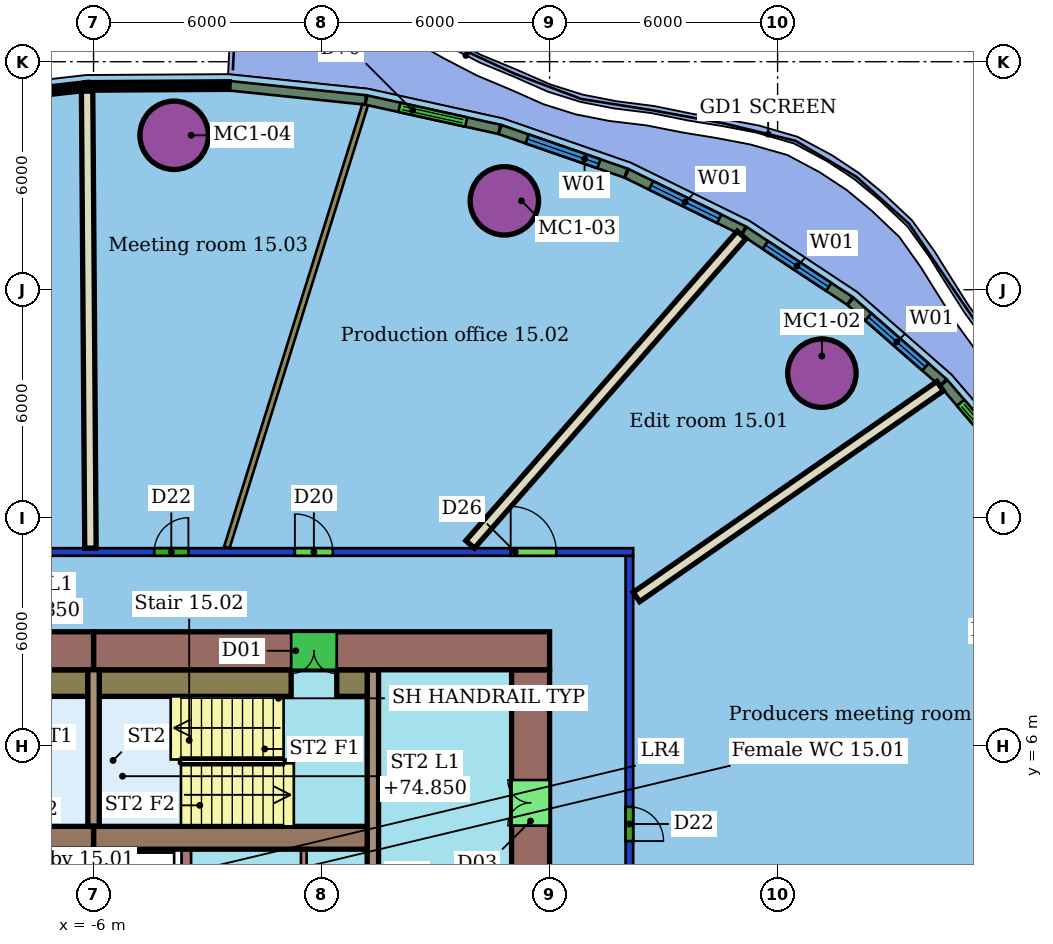
"""IFC4 building model, lengths in metres.
Left out: names, types, materials, properties, quantities, classifications, styles, units other than length and angle.
Written with IfcOpenShell. Run it as: python <this file> out.ifc"""

import sys

from ifc_helpers import new_model, si_unit, direction, frame, frame_2d, origin, origin_2d, place, context, subcontext, project, spatial, rectangle, hollow_circle, extrude, element, fill, save


model = new_model("IFC4")
c1 = context("Model", 3, precision=1e-05, world=origin(), true_north=direction((0.0, 1.0)))
c2 = subcontext(c1, "Body", "Model", "MODEL_VIEW")
j1 = project(units=[si_unit("LENGTHUNIT", "METRE"), si_unit("PLANEANGLEUNIT", "RADIAN")], contexts=[c1])
p1 = place(None, origin())
s1 = spatial("IfcSite", under=j1, at=p1, CompositionType="ELEMENT")
p2 = place(p1, origin())
s2 = spatial("IfcBuilding", under=s1, at=p2, CompositionType="ELEMENT")
p3 = place(p2, frame((0.0, 0.0, 73.0)))
s3 = spatial("IfcBuildingStorey", under=s2, at=p3, CompositionType="ELEMENT", Elevation=73.0)
for number, where, z_axis, x_axis in (
    (1, (13.166, 15.805, 0.0), (0.0, 0.0, 1.0), (1.0, 0.0, 0.0)),
    (2, (4.81, 20.339, 0.0), (0.0, 0.0, 1.0), (1.0, 0.0, 0.0)),
    (3, (-3.879, 22.064, 0.0), (0.0, 0.0, 1.0), (1.0, 0.0, 0.0)),
):
    element("IfcColumn", number, at=place(p3, frame(where, z_axis=z_axis, x_axis=x_axis)), inside=s3, PredefinedType="COLUMN", context=c2, shape_type="SweptSolid", body=[
        extrude(hollow_circle(Radius=0.9, WallThickness=0.06, at=origin_2d()), origin(), (0.0, 0.0, 1.0), 3.55),
    ])
p4 = place(p3, frame((-20.2, 11.1, 0.0), z_axis=(0.0, 0.0, 1.0), x_axis=(1.0, 0.0, 0.0)))
e4 = element("IfcWall", 4, at=p4, inside=s3, PredefinedType="PARTITIONING", context=c2, shape_type="SweptSolid", body=[
    extrude(rectangle(XDim=28.4, YDim=0.2, at=frame_2d((14.2, 0.0))), origin(), (0.0, 0.0, 1.0), 2.85),
])
p5 = place(p4, frame((25.176, 0.0, 0.0)))
e5 = element("IfcOpeningElement", 5, at=p5, cuts=e4, PredefinedType="OPENING", context=c2, shape_type="SweptSolid", body=[
    extrude(rectangle(XDim=1.2, YDim=2.1, at=frame_2d((0.6, 1.05))), frame((0.0, 0.11, 0.0), z_axis=(0.0, -1.0, 0.0), x_axis=(1.0, 0.0, 0.0)), (0.0, 0.0, 1.0), 0.22),
])
p6 = place(p4, frame((19.498, 0.0, 0.0)))
e6 = element("IfcOpeningElement", 6, at=p6, cuts=e4, PredefinedType="OPENING", context=c2, shape_type="SweptSolid", body=[
    extrude(rectangle(XDim=1.0, YDim=2.1, at=frame_2d((0.5, 1.05))), frame((0.0, 0.11, 0.0), z_axis=(0.0, -1.0, 0.0), x_axis=(1.0, 0.0, 0.0)), (0.0, 0.0, 1.0), 0.22),
])
p7 = place(p4, frame((15.796, 0.0, 0.0)))
e7 = element("IfcOpeningElement", 7, at=p7, cuts=e4, PredefinedType="OPENING", context=c2, shape_type="SweptSolid", body=[
    extrude(rectangle(XDim=0.9, YDim=2.1, at=frame_2d((0.45, 1.05))), frame((0.0, 0.11, 0.0), z_axis=(0.0, -1.0, 0.0), x_axis=(1.0, 0.0, 0.0)), (0.0, 0.0, 1.0), 0.22),
])
p8 = place(p4, frame((9.82, 0.0, 0.0)))
e8 = element("IfcOpeningElement", 8, at=p8, cuts=e4, PredefinedType="OPENING", context=c2, shape_type="SweptSolid", body=[
    extrude(rectangle(XDim=1.1, YDim=2.1, at=frame_2d((0.55, 1.05))), frame((0.0, 0.11, 0.0), z_axis=(0.0, -1.0, 0.0), x_axis=(1.0, 0.0, 0.0)), (0.0, 0.0, 1.0), 0.22),
])
p9 = place(p3, frame((8.1, 11.0, 0.0), z_axis=(0.0, 0.0, 1.0), x_axis=(0.0, -1.0, 0.0)))
e9 = element("IfcWall", 9, at=p9, inside=s3, PredefinedType="PARTITIONING", context=c2, shape_type="SweptSolid", body=[
    extrude(rectangle(XDim=22.0, YDim=0.2, at=frame_2d((11.0, 0.0))), origin(), (0.0, 0.0, 1.0), 2.85),
])
p10 = place(p9, frame((13.246, 0.0, 0.0)))
e10 = element("IfcOpeningElement", 10, at=p10, cuts=e9, PredefinedType="OPENING", context=c2, shape_type="SweptSolid", body=[
    extrude(rectangle(XDim=1.8, YDim=2.1, at=frame_2d((0.9, 1.05))), frame((0.0, 0.11, 0.0), z_axis=(0.0, -1.0, 0.0), x_axis=(1.0, 0.0, 0.0)), (0.0, 0.0, 1.0), 0.22),
])
p11 = place(p9, frame((6.607, 0.0, 0.0)))
e11 = element("IfcOpeningElement", 11, at=p11, cuts=e9, PredefinedType="OPENING", context=c2, shape_type="SweptSolid", body=[
    extrude(rectangle(XDim=0.9, YDim=2.1, at=frame_2d((0.45, 1.05))), frame((0.0, 0.11, 0.0), z_axis=(0.0, -1.0, 0.0), x_axis=(1.0, 0.0, 0.0)), (0.0, 0.0, 1.0), 0.22),
])
p12 = place(p3, frame((16.277, 15.463, 0.0), z_axis=(0.0, 0.0, 1.0), x_axis=(-0.821490466396, -0.57022224932, 0.0)))
e12 = element("IfcWall", 12, at=p12, inside=s3, PredefinedType="PARTITIONING", context=c2, shape_type="SweptSolid", body=[
    extrude(rectangle(XDim=9.728, YDim=0.3, at=frame_2d((4.864, 0.0))), origin(), (0.0, 0.0, 1.0), 3.55),
])
p13 = place(p3, frame((11.051, 19.441, 0.0), z_axis=(0.0, 0.0, 1.0), x_axis=(-0.659383505789, -0.75180675196, 0.0)))
e13 = element("IfcWall", 13, at=p13, inside=s3, PredefinedType="PARTITIONING", context=c2, shape_type="SweptSolid", body=[
    extrude(rectangle(XDim=10.83, YDim=0.3, at=frame_2d((5.415, 0.0))), origin(), (0.0, 0.0, 1.0), 3.55),
])
p14 = place(p3, frame((1.149, 22.87, 0.0), z_axis=(0.0, 0.0, 1.0), x_axis=(-0.298358151033, -0.954453987216, 0.0)))
e14 = element("IfcWall", 14, at=p14, inside=s3, PredefinedType="PARTITIONING", context=c2, shape_type="SweptSolid", body=[
    extrude(rectangle(XDim=12.203, YDim=0.15, at=frame_2d((6.102, 0.0))), origin(), (0.0, 0.0, 1.0), 3.55),
])
p15 = place(p3, frame((-6.17, 23.226, 0.0), z_axis=(0.0, 0.0, 1.0), x_axis=(0.007309152595, -0.999973287787, 0.0)))
e15 = element("IfcWall", 15, at=p15, inside=s3, PredefinedType="PARTITIONING", context=c2, shape_type="SweptSolid", body=[
    extrude(rectangle(XDim=12.025, YDim=0.3, at=frame_2d((6.012, 0.0))), origin(), (0.0, 0.0, 1.0), 3.55),
])
p16 = place(p3, frame((18.429, 13.147, 0.0), z_axis=(0.0, 0.0, 1.0), x_axis=(-0.651320140898, 0.75880305354, 0.0)))
e16 = element("IfcWall", 16, at=p16, inside=s3, PredefinedType="SOLIDWALL", context=c2, shape_type="SweptSolid", body=[
    extrude(rectangle(XDim=3.155, YDim=0.25, at=frame_2d((1.578, 0.0))), origin(), (0.0, 0.0, 1.0), 3.15),
])
p17 = place(p16, frame((0.677, 0.0, 0.0)))
e17 = element("IfcOpeningElement", 17, at=p17, cuts=e16, PredefinedType="OPENING", context=c2, shape_type="SweptSolid", body=[
    extrude(rectangle(XDim=1.8, YDim=2.4, at=frame_2d((0.9, 1.2))), frame((0.0, 0.135, 0.0), z_axis=(0.0, -1.0, 0.0), x_axis=(1.0, 0.0, 0.0)), (0.0, 0.0, 1.0), 0.27),
])
p18 = place(p3, frame((16.356, 15.56, 0.0), z_axis=(0.0, 0.0, 1.0), x_axis=(-0.752375826342, 0.658734101088, 0.0)))
e18 = element("IfcWall", 18, at=p18, inside=s3, PredefinedType="SOLIDWALL", context=c2, shape_type="SweptSolid", body=[
    extrude(rectangle(XDim=3.238, YDim=0.25, at=frame_2d((1.619, 0.0))), origin(), (0.0, 0.0, 1.0), 3.15),
])
p19 = place(p18, frame((0.619, 0.0, 0.8)))
e19 = element("IfcOpeningElement", 19, at=p19, cuts=e18, PredefinedType="OPENING", context=c2, shape_type="SweptSolid", body=[
    extrude(rectangle(XDim=2.0, YDim=2.2, at=frame_2d((1.0, 1.1))), frame((0.0, 0.135, 0.0), z_axis=(0.0, -1.0, 0.0), x_axis=(1.0, 0.0, 0.0)), (0.0, 0.0, 1.0), 0.27),
])
p20 = place(p3, frame((13.9, 17.708, 0.0), z_axis=(0.0, 0.0, 1.0), x_axis=(-0.834288934292, 0.551327465413, 0.0)))
e20 = element("IfcWall", 20, at=p20, inside=s3, PredefinedType="SOLIDWALL", context=c2, shape_type="SweptSolid", body=[
    extrude(rectangle(XDim=3.329, YDim=0.25, at=frame_2d((1.664, 0.0))), origin(), (0.0, 0.0, 1.0), 3.15),
])
p21 = place(p20, frame((0.664, 0.0, 0.8)))
e21 = element("IfcOpeningElement", 21, at=p21, cuts=e20, PredefinedType="OPENING", context=c2, shape_type="SweptSolid", body=[
    extrude(rectangle(XDim=2.0, YDim=2.2, at=frame_2d((1.0, 1.1))), frame((0.0, 0.135, 0.0), z_axis=(0.0, -1.0, 0.0), x_axis=(1.0, 0.0, 0.0)), (0.0, 0.0, 1.0), 0.27),
])
p22 = place(p3, frame((11.102, 19.555, 0.0), z_axis=(0.0, 0.0, 1.0), x_axis=(-0.89802471606, 0.439945007184, 0.0)))
e22 = element("IfcWall", 22, at=p22, inside=s3, PredefinedType="SOLIDWALL", context=c2, shape_type="SweptSolid", body=[
    extrude(rectangle(XDim=3.419, YDim=0.25, at=frame_2d((1.71, 0.0))), origin(), (0.0, 0.0, 1.0), 3.15),
])
p23 = place(p22, frame((0.71, 0.0, 0.8)))
e23 = element("IfcOpeningElement", 23, at=p23, cuts=e22, PredefinedType="OPENING", context=c2, shape_type="SweptSolid", body=[
    extrude(rectangle(XDim=2.0, YDim=2.2, at=frame_2d((1.0, 1.1))), frame((0.0, 0.135, 0.0), z_axis=(0.0, -1.0, 0.0), x_axis=(1.0, 0.0, 0.0)), (0.0, 0.0, 1.0), 0.27),
])
p24 = place(p3, frame((8.01, 21.069, 0.0), z_axis=(0.0, 0.0, 1.0), x_axis=(-0.944948803813, 0.327218211861, 0.0)))
e24 = element("IfcWall", 24, at=p24, inside=s3, PredefinedType="SOLIDWALL", context=c2, shape_type="SweptSolid", body=[
    extrude(rectangle(XDim=3.505, YDim=0.25, at=frame_2d((1.752, 0.0))), origin(), (0.0, 0.0, 1.0), 3.15),
])
p25 = place(p24, frame((0.753, 0.0, 0.8)))
e25 = element("IfcOpeningElement", 25, at=p25, cuts=e24, PredefinedType="OPENING", context=c2, shape_type="SweptSolid", body=[
    extrude(rectangle(XDim=2.0, YDim=2.2, at=frame_2d((1.0, 1.1))), frame((0.0, 0.135, 0.0), z_axis=(0.0, -1.0, 0.0), x_axis=(1.0, 0.0, 0.0)), (0.0, 0.0, 1.0), 0.27),
])
p26 = place(p3, frame((4.676, 22.222, 0.0), z_axis=(0.0, 0.0, 1.0), x_axis=(-0.976653338545, 0.214821452162, 0.0)))
e26 = element("IfcWall", 26, at=p26, inside=s3, PredefinedType="SOLIDWALL", context=c2, shape_type="SweptSolid", body=[
    extrude(rectangle(XDim=3.58, YDim=0.25, at=frame_2d((1.79, 0.0))), origin(), (0.0, 0.0, 1.0), 3.15),
])
p27 = place(p26, frame((0.89, 0.0, 0.0)))
e27 = element("IfcOpeningElement", 27, at=p27, cuts=e26, PredefinedType="OPENING", context=c2, shape_type="SweptSolid", body=[
    extrude(rectangle(XDim=1.8, YDim=2.4, at=frame_2d((0.9, 1.2))), frame((0.0, 0.135, 0.0), z_axis=(0.0, -1.0, 0.0), x_axis=(1.0, 0.0, 0.0)), (0.0, 0.0, 1.0), 0.27),
])
p28 = place(p3, frame((1.157, 22.994, 0.0), z_axis=(0.0, 0.0, 1.0), x_axis=(-0.994624966302, 0.10354311377, 0.0)))
e28 = element("IfcWall", 28, at=p28, inside=s3, PredefinedType="SOLIDWALL", context=c2, shape_type="SweptSolid", body=[
    extrude(rectangle(XDim=3.596, YDim=0.25, at=frame_2d((1.798, 0.0))), origin(), (0.0, 0.0, 1.0), 3.15),
])
p29 = place(p3, frame((6.0, 8.5, 0.0), z_axis=(0.0, 0.0, 1.0), x_axis=(-1.0, 0.0, 0.0)))
e29 = element("IfcWall", 29, at=p29, inside=s3, PredefinedType="SHEAR", context=c2, shape_type="SweptSolid", body=[
    extrude(rectangle(XDim=12.0, YDim=1.0, at=frame_2d((6.0, 0.0))), origin(), (0.0, 0.0, 1.0), 3.4),
])
p30 = place(p29, frame((5.6, 0.0, 0.0)))
e30 = element("IfcOpeningElement", 30, at=p30, cuts=e29, PredefinedType="OPENING", context=c2, shape_type="SweptSolid", body=[
    extrude(rectangle(XDim=1.2, YDim=2.1, at=frame_2d((0.6, 1.05))), frame((0.0, 0.51, 0.0), z_axis=(0.0, -1.0, 0.0), x_axis=(1.0, 0.0, 0.0)), (0.0, 0.0, 1.0), 1.02),
])
p31 = place(p3, frame((-6.0, 8.5, 0.0), z_axis=(0.0, 0.0, 1.0), x_axis=(-1.0, 0.0, 0.0)))
e31 = element("IfcWall", 31, at=p31, inside=s3, PredefinedType="SHEAR", context=c2, shape_type="SweptSolid", body=[
    extrude(rectangle(XDim=12.0, YDim=1.0, at=frame_2d((6.0, 0.0))), origin(), (0.0, 0.0, 1.0), 3.4),
])
p32 = place(p31, frame((5.2, 0.0, 0.0)))
e32 = element("IfcOpeningElement", 32, at=p32, cuts=e31, PredefinedType="OPENING", context=c2, shape_type="SweptSolid", body=[
    extrude(rectangle(XDim=1.2, YDim=2.1, at=frame_2d((0.6, 1.05))), frame((0.0, 0.51, 0.0), z_axis=(0.0, -1.0, 0.0), x_axis=(1.0, 0.0, 0.0)), (0.0, 0.0, 1.0), 1.02),
])
p33 = place(p3, frame((5.5, -8.0, 0.0), z_axis=(0.0, 0.0, 1.0), x_axis=(0.0, 1.0, 0.0)))
e33 = element("IfcWall", 33, at=p33, inside=s3, PredefinedType="SHEAR", context=c2, shape_type="SweptSolid", body=[
    extrude(rectangle(XDim=16.0, YDim=1.0, at=frame_2d((8.0, 0.0))), origin(), (0.0, 0.0, 1.0), 3.4),
])
p34 = place(p33, frame((2.9, 0.0, 0.0)))
e34 = element("IfcOpeningElement", 34, at=p34, cuts=e33, PredefinedType="OPENING", context=c2, shape_type="SweptSolid", body=[
    extrude(rectangle(XDim=1.2, YDim=2.1, at=frame_2d((0.6, 1.05))), frame((0.0, 0.51, 0.0), z_axis=(0.0, -1.0, 0.0), x_axis=(1.0, 0.0, 0.0)), (0.0, 0.0, 1.0), 1.02),
])
p35 = place(p33, frame((11.9, 0.0, 0.0)))
e35 = element("IfcOpeningElement", 35, at=p35, cuts=e33, PredefinedType="OPENING", context=c2, shape_type="SweptSolid", body=[
    extrude(rectangle(XDim=1.2, YDim=2.1, at=frame_2d((0.6, 1.05))), frame((0.0, 0.51, 0.0), z_axis=(0.0, -1.0, 0.0), x_axis=(1.0, 0.0, 0.0)), (0.0, 0.0, 1.0), 1.02),
])
for number, where, z_axis, x_axis in (
    (36, (-13.2, 3.58, 0.0), (0.0, 0.0, 1.0), (1.0, 0.0, 0.0)),
    (37, (-6.0, 3.58, 0.0), (0.0, 0.0, 1.0), (1.0, 0.0, 0.0)),
):
    element("IfcWall", number, at=place(p3, frame(where, z_axis=z_axis, x_axis=x_axis)), inside=s3, PredefinedType="SHEAR", context=c2, shape_type="SweptSolid", body=[
        extrude(rectangle(XDim=7.2, YDim=0.6, at=frame_2d((3.6, 0.0))), origin(), (0.0, 0.0, 1.0), 3.4),
    ])
p36 = place(p3, frame((1.35, -8.0, 0.0), z_axis=(0.0, 0.0, 1.0), x_axis=(0.0, 1.0, 0.0)))
e38 = element("IfcWall", 38, at=p36, inside=s3, PredefinedType="SHEAR", context=c2, shape_type="SweptSolid", body=[
    extrude(rectangle(XDim=16.0, YDim=0.3, at=frame_2d((8.0, 0.0))), origin(), (0.0, 0.0, 1.0), 3.4),
])
p37 = place(p36, frame((1.91, 0.0, 0.0)))
e39 = element("IfcOpeningElement", 39, at=p37, cuts=e38, PredefinedType="OPENING", context=c2, shape_type="SweptSolid", body=[
    extrude(rectangle(XDim=1.0, YDim=2.1, at=frame_2d((0.5, 1.05))), frame((0.0, 0.16, 0.0), z_axis=(0.0, -1.0, 0.0), x_axis=(1.0, 0.0, 0.0)), (0.0, 0.0, 1.0), 0.32),
])
p38 = place(p36, frame((7.25, 0.0, 0.0)))
e40 = element("IfcOpeningElement", 40, at=p38, cuts=e38, PredefinedType="OPENING", context=c2, shape_type="SweptSolid", body=[
    extrude(rectangle(XDim=1.5, YDim=2.1, at=frame_2d((0.75, 1.05))), frame((0.0, 0.16, 0.0), z_axis=(0.0, -1.0, 0.0), x_axis=(1.0, 0.0, 0.0)), (0.0, 0.0, 1.0), 0.32),
])
p39 = place(p3, frame((-6.0, 3.88, 0.0), z_axis=(0.0, 0.0, 1.0), x_axis=(0.0, 1.0, 0.0)))
e41 = element("IfcWall", 41, at=p39, inside=s3, PredefinedType="SHEAR", context=c2, shape_type="SweptSolid", body=[
    extrude(rectangle(XDim=4.12, YDim=0.3, at=frame_2d((2.06, 0.0))), origin(), (0.0, 0.0, 1.0), 3.4),
])
for number, where, z_axis, x_axis in (
    (42, (-11.2, 7.65, 0.0), (0.0, 0.0, 1.0), (1.0, 0.0, 0.0)),
    (43, (-5.85, 7.65, 0.0), (0.0, 0.0, 1.0), (1.0, 0.0, 0.0)),
):
    element("IfcWall", number, at=place(p3, frame(where, z_axis=z_axis, x_axis=x_axis)), inside=s3, PredefinedType="SHEAR", context=c2, shape_type="SweptSolid", body=[
        extrude(rectangle(XDim=5.05, YDim=0.7, at=frame_2d((2.525, 0.0))), origin(), (0.0, 0.0, 1.0), 3.4),
    ])
p40 = place(p3, frame((0.4, 7.65, 0.0), z_axis=(0.0, 0.0, 1.0), x_axis=(1.0, 0.0, 0.0)))
e44 = element("IfcWall", 44, at=p40, inside=s3, PredefinedType="SHEAR", context=c2, shape_type="SweptSolid", body=[
    extrude(rectangle(XDim=0.8, YDim=0.7, at=frame_2d((0.4, 0.0))), origin(), (0.0, 0.0, 1.0), 3.4),
])
for number, where, z_axis, x_axis in (
    (45, (-6.0, 1.6, 0.0), (0.0, 0.0, 1.0), (0.0, 1.0, 0.0)),
    (46, (-3.558, 1.6, 0.0), (0.0, 0.0, 1.0), (0.0, 1.0, 0.0)),
):
    element("IfcWall", number, at=place(p3, frame(where, z_axis=z_axis, x_axis=x_axis)), inside=s3, PredefinedType="SHEAR", context=c2, shape_type="SweptSolid", body=[
        extrude(rectangle(XDim=1.68, YDim=0.25, at=frame_2d((0.84, 0.0))), origin(), (0.0, 0.0, 1.0), 3.4),
    ])
p41 = place(p3, frame((-0.468, 1.6, 0.0), z_axis=(0.0, 0.0, 1.0), x_axis=(0.0, 1.0, 0.0)))
e47 = element("IfcWall", 47, at=p41, inside=s3, PredefinedType="PARTITIONING", context=c2, shape_type="SweptSolid", body=[
    extrude(rectangle(XDim=1.68, YDim=0.15, at=frame_2d((0.84, 0.0))), origin(), (0.0, 0.0, 1.0), 3.4),
])
p42 = place(p5, origin())
e48 = element("IfcDoor", 48, at=p42, inside=s3, OperationType="SINGLE_SWING_LEFT", PredefinedType="DOOR", context=c2, shape_type="SweptSolid", body=[
    extrude(rectangle(XDim=1.2, YDim=2.1, at=frame_2d((0.6, 1.05))), frame((0.0, 0.025, 0.0), z_axis=(0.0, -1.0, 0.0), x_axis=(1.0, 0.0, 0.0)), (0.0, 0.0, 1.0), 0.05),
])
fill(e5, e48)
p43 = place(p6, origin())
e49 = element("IfcDoor", 49, at=p43, inside=s3, OperationType="SINGLE_SWING_LEFT", PredefinedType="DOOR", context=c2, shape_type="SweptSolid", body=[
    extrude(rectangle(XDim=1.0, YDim=2.1, at=frame_2d((0.5, 1.05))), frame((0.0, 0.025, 0.0), z_axis=(0.0, -1.0, 0.0), x_axis=(1.0, 0.0, 0.0)), (0.0, 0.0, 1.0), 0.05),
])
fill(e6, e49)
p44 = place(p7, origin())
e50 = element("IfcDoor", 50, at=p44, inside=s3, OperationType="SINGLE_SWING_RIGHT", PredefinedType="DOOR", context=c2, shape_type="SweptSolid", body=[
    extrude(rectangle(XDim=0.9, YDim=2.1, at=frame_2d((0.45, 1.05))), frame((0.0, 0.025, 0.0), z_axis=(0.0, -1.0, 0.0), x_axis=(1.0, 0.0, 0.0)), (0.0, 0.0, 1.0), 0.05),
])
fill(e7, e50)
p45 = place(p11, origin())
e51 = element("IfcDoor", 51, at=p45, inside=s3, OperationType="SINGLE_SWING_RIGHT", PredefinedType="DOOR", context=c2, shape_type="SweptSolid", body=[
    extrude(rectangle(XDim=0.9, YDim=2.1, at=frame_2d((0.45, 1.05))), frame((0.0, 0.025, 0.0), z_axis=(0.0, -1.0, 0.0), x_axis=(1.0, 0.0, 0.0)), (0.0, 0.0, 1.0), 0.05),
])
fill(e11, e51)
p46 = place(p17, origin())
e52 = element("IfcDoor", 52, at=p46, inside=s3, OperationType="DOUBLE_DOOR_SLIDING", PredefinedType="DOOR", context=c2, shape_type="SweptSolid", body=[
    extrude(rectangle(XDim=1.8, YDim=2.4, at=frame_2d((0.9, 1.2))), frame((0.0, 0.025, 0.0), z_axis=(0.0, -1.0, 0.0), x_axis=(1.0, 0.0, 0.0)), (0.0, 0.0, 1.0), 0.05),
])
fill(e17, e52)
p47 = place(p19, origin())
e53 = element("IfcWindow", 53, at=p47, inside=s3, PartitioningType="SINGLE_PANEL", PredefinedType="WINDOW", context=c2, shape_type="SweptSolid", body=[
    extrude(rectangle(XDim=2.0, YDim=2.2, at=frame_2d((1.0, 1.1))), frame((0.0, 0.03, 0.0), z_axis=(0.0, -1.0, 0.0), x_axis=(1.0, 0.0, 0.0)), (0.0, 0.0, 1.0), 0.06),
])
fill(e19, e53)
p48 = place(p21, origin())
e54 = element("IfcWindow", 54, at=p48, inside=s3, PartitioningType="SINGLE_PANEL", PredefinedType="WINDOW", context=c2, shape_type="SweptSolid", body=[
    extrude(rectangle(XDim=2.0, YDim=2.2, at=frame_2d((1.0, 1.1))), frame((0.0, 0.03, 0.0), z_axis=(0.0, -1.0, 0.0), x_axis=(1.0, 0.0, 0.0)), (0.0, 0.0, 1.0), 0.06),
])
fill(e21, e54)
p49 = place(p23, origin())
e55 = element("IfcWindow", 55, at=p49, inside=s3, PartitioningType="SINGLE_PANEL", PredefinedType="WINDOW", context=c2, shape_type="SweptSolid", body=[
    extrude(rectangle(XDim=2.0, YDim=2.2, at=frame_2d((1.0, 1.1))), frame((0.0, 0.03, 0.0), z_axis=(0.0, -1.0, 0.0), x_axis=(1.0, 0.0, 0.0)), (0.0, 0.0, 1.0), 0.06),
])
fill(e23, e55)
p50 = place(p25, origin())
e56 = element("IfcWindow", 56, at=p50, inside=s3, PartitioningType="SINGLE_PANEL", PredefinedType="WINDOW", context=c2, shape_type="SweptSolid", body=[
    extrude(rectangle(XDim=2.0, YDim=2.2, at=frame_2d((1.0, 1.1))), frame((0.0, 0.03, 0.0), z_axis=(0.0, -1.0, 0.0), x_axis=(1.0, 0.0, 0.0)), (0.0, 0.0, 1.0), 0.06),
])
fill(e25, e56)
p51 = place(p27, origin())
e57 = element("IfcDoor", 57, at=p51, inside=s3, OperationType="DOUBLE_DOOR_SLIDING", PredefinedType="DOOR", context=c2, shape_type="SweptSolid", body=[
    extrude(rectangle(XDim=1.8, YDim=2.4, at=frame_2d((0.9, 1.2))), frame((0.0, 0.025, 0.0), z_axis=(0.0, -1.0, 0.0), x_axis=(1.0, 0.0, 0.0)), (0.0, 0.0, 1.0), 0.05),
])
fill(e27, e57)
p52 = place(p30, origin())
e58 = element("IfcDoor", 58, at=p52, inside=s3, OperationType="DOUBLE_DOOR_SINGLE_SWING", PredefinedType="NOTDEFINED", context=c2, shape_type="SweptSolid", body=[
    extrude(rectangle(XDim=1.2, YDim=2.1, at=frame_2d((0.6, 1.05))), frame((0.0, 0.025, 0.0), z_axis=(0.0, -1.0, 0.0), x_axis=(1.0, 0.0, 0.0)), (0.0, 0.0, 1.0), 0.05),
])
fill(e30, e58)
p53 = place(p35, origin())
e59 = element("IfcDoor", 59, at=p53, inside=s3, OperationType="DOUBLE_DOOR_SINGLE_SWING", PredefinedType="NOTDEFINED", context=c2, shape_type="SweptSolid", body=[
    extrude(rectangle(XDim=1.2, YDim=2.1, at=frame_2d((0.6, 1.05))), frame((0.0, 0.025, 0.0), z_axis=(0.0, -1.0, 0.0), x_axis=(1.0, 0.0, 0.0)), (0.0, 0.0, 1.0), 0.05),
])
fill(e35, e59)
save(model, sys.argv[1])
